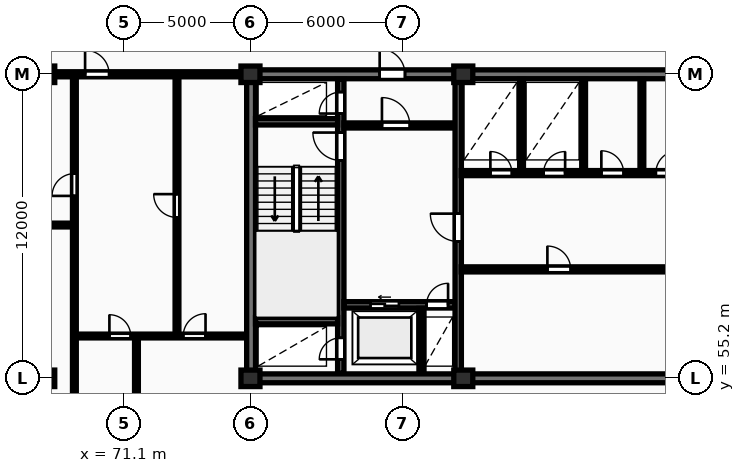
"""IFC4 building model, lengths in metres.
Left out: names, types, materials, properties, quantities, classifications, styles, units other than length and angle.
Written with IfcOpenShell. Run it as: python <this file> out.ifc"""

import sys

from ifc_helpers import new_model, si_unit, direction, frame, frame_2d, origin, origin_2d, place, context, subcontext, project, spatial, rectangle, extrude, element, fill, save


model = new_model("IFC4")
c1 = context("Model", 3, precision=1e-05, world=origin(), true_north=direction((0.0, 1.0)))
c2 = subcontext(c1, "Body", "Model", "MODEL_VIEW")
j1 = project(units=[si_unit("LENGTHUNIT", "METRE"), si_unit("PLANEANGLEUNIT", "RADIAN")], contexts=[c1])
p1 = place(None, origin())
s1 = spatial("IfcSite", under=j1, at=p1, CompositionType="ELEMENT")
p2 = place(p1, origin())
s2 = spatial("IfcBuilding", under=s1, at=p2, CompositionType="ELEMENT")
p3 = place(p2, frame((0.0, 0.0, 242.45)))
s3 = spatial("IfcBuildingStorey", under=s2, at=p3, CompositionType="ELEMENT", Elevation=242.45)
for number, where, z_axis, x_axis in (
    (1, (68.0, 55.2, 0.0), (0.0, 0.0, 1.0), (1.0, 0.0, 0.0)),
    (2, (68.0, 67.2, 0.0), (0.0, 0.0, 1.0), (1.0, 0.0, 0.0)),
    (3, (76.1, 55.2, 0.0), (0.0, 0.0, 1.0), (1.0, 0.0, 0.0)),
    (4, (76.1, 67.2, 0.0), (0.0, 0.0, 1.0), (1.0, 0.0, 0.0)),
    (5, (84.5, 55.2, 0.0), (0.0, 0.0, 1.0), (1.0, 0.0, 0.0)),
    (6, (84.5, 67.2, 0.0), (0.0, 0.0, 1.0), (1.0, 0.0, 0.0)),
):
    element("IfcColumn", number, at=place(p3, frame(where, z_axis=z_axis, x_axis=x_axis)), inside=s3, PredefinedType="COLUMN", context=c2, shape_type="SweptSolid", body=[
        extrude(rectangle(XDim=0.75, YDim=0.65, at=origin_2d()), origin(), (0.0, 0.0, 1.0), 3.45),
    ])
p4 = place(p3, frame((75.95, 55.2, 0.0), z_axis=(0.0, 0.0, 1.0), x_axis=(1.0, 0.0, 0.0)))
e7 = element("IfcWall", 7, at=p4, inside=s3, PredefinedType="SHEAR", context=c2, shape_type="SweptSolid", body=[
    extrude(rectangle(XDim=36.3, YDim=0.35, at=frame_2d((18.15, 0.0))), origin(), (0.0, 0.0, 1.0), 3.45),
])
p5 = place(p3, frame((76.125, 55.375, 0.0), z_axis=(0.0, 0.0, 1.0), x_axis=(0.0, 1.0, 0.0)))
e8 = element("IfcWall", 8, at=p5, inside=s3, PredefinedType="SHEAR", context=c2, shape_type="SweptSolid", body=[
    extrude(rectangle(XDim=11.65, YDim=0.35, at=frame_2d((5.825, 0.0))), origin(), (0.0, 0.0, 1.0), 3.45),
])
p6 = place(p3, frame((75.95, 67.2, 0.0), z_axis=(0.0, 0.0, 1.0), x_axis=(1.0, 0.0, 0.0)))
e9 = element("IfcWall", 9, at=p6, inside=s3, PredefinedType="SHEAR", context=c2, shape_type="SweptSolid", body=[
    extrude(rectangle(XDim=36.3, YDim=0.35, at=frame_2d((18.15, 0.0))), origin(), (0.0, 0.0, 1.0), 3.45),
])
p7 = place(p6, frame((5.25, 0.0, 0.0)))
e10 = element("IfcOpeningElement", 10, at=p7, cuts=e9, PredefinedType="OPENING", context=c2, shape_type="SweptSolid", body=[
    extrude(rectangle(XDim=1.0, YDim=2.15, at=frame_2d((0.5, 1.075))), frame((0.0, 0.185, 0.0), z_axis=(0.0, -1.0, 0.0), x_axis=(1.0, 0.0, 0.0)), (0.0, 0.0, 1.0), 0.37),
])
p8 = place(p6, frame((21.6, 0.0, 0.0)))
e11 = element("IfcOpeningElement", 11, at=p8, cuts=e9, PredefinedType="OPENING", context=c2, shape_type="SweptSolid", body=[
    extrude(rectangle(XDim=1.5, YDim=2.2, at=frame_2d((0.75, 1.1))), frame((0.0, 0.185, 0.0), z_axis=(0.0, -1.0, 0.0), x_axis=(1.0, 0.0, 0.0)), (0.0, 0.0, 1.0), 0.37),
])
p9 = place(p6, frame((30.45, 0.0, 0.0)))
e12 = element("IfcOpeningElement", 12, at=p9, cuts=e9, PredefinedType="OPENING", context=c2, shape_type="SweptSolid", body=[
    extrude(rectangle(XDim=1.0, YDim=2.15, at=frame_2d((0.5, 1.075))), frame((0.0, 0.185, 0.0), z_axis=(0.0, -1.0, 0.0), x_axis=(1.0, 0.0, 0.0)), (0.0, 0.0, 1.0), 0.37),
])
p10 = place(p3, frame((79.665, 55.4, 0.0), z_axis=(0.0, 0.0, 1.0), x_axis=(0.0, 1.0, 0.0)))
e13 = element("IfcWall", 13, at=p10, inside=s3, PredefinedType="SHEAR", context=c2, shape_type="SweptSolid", body=[
    extrude(rectangle(XDim=11.6, YDim=0.25, at=frame_2d((5.8, 0.0))), origin(), (0.0, 0.0, 1.0), 3.45),
])
p11 = place(p10, frame((0.55, 0.0, 0.0)))
e14 = element("IfcOpeningElement", 14, at=p11, cuts=e13, PredefinedType="OPENING", context=c2, shape_type="SweptSolid", body=[
    extrude(rectangle(XDim=0.85, YDim=2.05, at=frame_2d((0.425, 1.025))), frame((0.0, 0.135, 0.0), z_axis=(0.0, -1.0, 0.0), x_axis=(1.0, 0.0, 0.0)), (0.0, 0.0, 1.0), 0.27),
])
p12 = place(p10, frame((8.4, 0.0, 0.0)))
e15 = element("IfcOpeningElement", 15, at=p12, cuts=e13, PredefinedType="OPENING", context=c2, shape_type="SweptSolid", body=[
    extrude(rectangle(XDim=1.1, YDim=2.1, at=frame_2d((0.55, 1.05))), frame((0.0, 0.135, 0.0), z_axis=(0.0, -1.0, 0.0), x_axis=(1.0, 0.0, 0.0)), (0.0, 0.0, 1.0), 0.27),
])
p13 = place(p10, frame((10.25, 0.0, 0.0)))
e16 = element("IfcOpeningElement", 16, at=p13, cuts=e13, PredefinedType="OPENING", context=c2, shape_type="SweptSolid", body=[
    extrude(rectangle(XDim=0.85, YDim=2.05, at=frame_2d((0.425, 1.025))), frame((0.0, 0.135, 0.0), z_axis=(0.0, -1.0, 0.0), x_axis=(1.0, 0.0, 0.0)), (0.0, 0.0, 1.0), 0.27),
])
for number, where, z_axis, x_axis in (
    (17, (76.3, 57.475, 0.0), (0.0, 0.0, 1.0), (1.0, 0.0, 0.0)),
    (18, (76.3, 65.325, 0.0), (0.0, 0.0, 1.0), (1.0, 0.0, 0.0)),
):
    element("IfcWall", number, at=place(p3, frame(where, z_axis=z_axis, x_axis=x_axis)), inside=s3, PredefinedType="SHEAR", context=c2, shape_type="SweptSolid", body=[
        extrude(rectangle(XDim=3.24, YDim=0.25, at=frame_2d((1.62, 0.0))), origin(), (0.0, 0.0, 1.0), 3.45),
    ])
p14 = place(p3, frame((79.79, 58.1, 0.0), z_axis=(0.0, 0.0, 1.0), x_axis=(1.0, 0.0, 0.0)))
e19 = element("IfcWall", 19, at=p14, inside=s3, PredefinedType="SHEAR", context=c2, shape_type="SweptSolid", body=[
    extrude(rectangle(XDim=4.39, YDim=0.25, at=frame_2d((2.195, 0.0))), origin(), (0.0, 0.0, 1.0), 3.45),
])
p15 = place(p14, frame((1.05, 0.0, 0.0)))
e20 = element("IfcOpeningElement", 20, at=p15, cuts=e19, PredefinedType="OPENING", context=c2, shape_type="SweptSolid", body=[
    extrude(rectangle(XDim=1.12, YDim=2.12, at=frame_2d((0.56, 1.06))), frame((0.0, 0.135, 0.0), z_axis=(0.0, -1.0, 0.0), x_axis=(1.0, 0.0, 0.0)), (0.0, 0.0, 1.0), 0.27),
])
p16 = place(p14, frame((3.26, 0.0, 0.0)))
e21 = element("IfcOpeningElement", 21, at=p16, cuts=e19, PredefinedType="OPENING", context=c2, shape_type="SweptSolid", body=[
    extrude(rectangle(XDim=0.85, YDim=2.05, at=frame_2d((0.425, 1.025))), frame((0.0, 0.135, 0.0), z_axis=(0.0, -1.0, 0.0), x_axis=(1.0, 0.0, 0.0)), (0.0, 0.0, 1.0), 0.27),
])
p17 = place(p3, frame((82.85, 55.4, 0.0), z_axis=(0.0, 0.0, 1.0), x_axis=(0.0, 1.0, 0.0)))
e22 = element("IfcWall", 22, at=p17, inside=s3, PredefinedType="PARTITIONING", context=c2, shape_type="SweptSolid", body=[
    extrude(rectangle(XDim=2.56, YDim=0.2, at=frame_2d((1.28, 0.0))), origin(), (0.0, 0.0, 1.0), 3.17),
])
p18 = place(p3, frame((79.79, 65.18, 0.0), z_axis=(0.0, 0.0, 1.0), x_axis=(1.0, 0.0, 0.0)))
e23 = element("IfcWall", 23, at=p18, inside=s3, PredefinedType="PARTITIONING", context=c2, shape_type="SweptSolid", body=[
    extrude(rectangle(XDim=4.39, YDim=0.2, at=frame_2d((2.195, 0.0))), origin(), (0.0, 0.0, 1.0), 3.17),
])
p19 = place(p18, frame((1.5, 0.0, 0.0)))
e24 = element("IfcOpeningElement", 24, at=p19, cuts=e23, PredefinedType="OPENING", context=c2, shape_type="SweptSolid", body=[
    extrude(rectangle(XDim=1.1, YDim=2.1, at=frame_2d((0.55, 1.05))), frame((0.0, 0.11, 0.0), z_axis=(0.0, -1.0, 0.0), x_axis=(1.0, 0.0, 0.0)), (0.0, 0.0, 1.0), 0.22),
])
p20 = place(p3, frame((84.3, 55.4, 0.0), z_axis=(0.0, 0.0, 1.0), x_axis=(0.0, 1.0, 0.0)))
e25 = element("IfcWall", 25, at=p20, inside=s3, PredefinedType="SHEAR", context=c2, shape_type="SweptSolid", body=[
    extrude(rectangle(XDim=11.6, YDim=0.25, at=frame_2d((5.8, 0.0))), origin(), (0.0, 0.0, 1.0), 3.45),
])
p21 = place(p20, frame((5.2, 0.0, 0.0)))
e26 = element("IfcOpeningElement", 26, at=p21, cuts=e25, PredefinedType="OPENING", context=c2, shape_type="SweptSolid", body=[
    extrude(rectangle(XDim=1.1, YDim=2.1, at=frame_2d((0.55, 1.05))), frame((0.0, 0.135, 0.0), z_axis=(0.0, -1.0, 0.0), x_axis=(1.0, 0.0, 0.0)), (0.0, 0.0, 1.0), 0.27),
])
p22 = place(p3, frame((84.42, 59.5, 0.0), z_axis=(0.0, 0.0, 1.0), x_axis=(1.0, 0.0, 0.0)))
e27 = element("IfcWall", 27, at=p22, inside=s3, PredefinedType="PARTITIONING", context=c2, shape_type="SweptSolid", body=[
    extrude(rectangle(XDim=8.36, YDim=0.2, at=frame_2d((4.18, 0.0))), origin(), (0.0, 0.0, 1.0), 3.17),
])
p23 = place(p22, frame((3.4, 0.0, 0.0)))
e28 = element("IfcOpeningElement", 28, at=p23, cuts=e27, PredefinedType="OPENING", context=c2, shape_type="SweptSolid", body=[
    extrude(rectangle(XDim=0.92, YDim=2.08, at=frame_2d((0.46, 1.04))), frame((0.0, 0.11, 0.0), z_axis=(0.0, -1.0, 0.0), x_axis=(1.0, 0.0, 0.0)), (0.0, 0.0, 1.0), 0.22),
])
for number, where, z_axis, x_axis in (
    (29, (86.8, 63.4, 0.0), (0.0, 0.0, 1.0), (0.0, 1.0, 0.0)),
    (30, (89.25, 63.4, 0.0), (0.0, 0.0, 1.0), (0.0, 1.0, 0.0)),
    (31, (91.55, 63.4, 0.0), (0.0, 0.0, 1.0), (0.0, 1.0, 0.0)),
):
    element("IfcWall", number, at=place(p3, frame(where, z_axis=z_axis, x_axis=x_axis)), inside=s3, PredefinedType="PARTITIONING", context=c2, shape_type="SweptSolid", body=[
        extrude(rectangle(XDim=3.6, YDim=0.15, at=frame_2d((1.8, 0.0))), origin(), (0.0, 0.0, 1.0), 3.17),
    ])
p24 = place(p3, frame((84.42, 63.3, 0.0), z_axis=(0.0, 0.0, 1.0), x_axis=(1.0, 0.0, 0.0)))
e32 = element("IfcWall", 32, at=p24, inside=s3, PredefinedType="PARTITIONING", context=c2, shape_type="SweptSolid", body=[
    extrude(rectangle(XDim=19.83, YDim=0.2, at=frame_2d((9.915, 0.0))), origin(), (0.0, 0.0, 1.0), 3.17),
])
p25 = place(p24, frame((1.15, 0.0, 0.0)))
e33 = element("IfcOpeningElement", 33, at=p25, cuts=e32, PredefinedType="OPENING", context=c2, shape_type="SweptSolid", body=[
    extrude(rectangle(XDim=0.85, YDim=2.05, at=frame_2d((0.425, 1.025))), frame((0.0, 0.11, 0.0), z_axis=(0.0, -1.0, 0.0), x_axis=(1.0, 0.0, 0.0)), (0.0, 0.0, 1.0), 0.22),
])
p26 = place(p24, frame((3.25, 0.0, 0.0)))
e34 = element("IfcOpeningElement", 34, at=p26, cuts=e32, PredefinedType="OPENING", context=c2, shape_type="SweptSolid", body=[
    extrude(rectangle(XDim=0.85, YDim=2.05, at=frame_2d((0.425, 1.025))), frame((0.0, 0.11, 0.0), z_axis=(0.0, -1.0, 0.0), x_axis=(1.0, 0.0, 0.0)), (0.0, 0.0, 1.0), 0.22),
])
p27 = place(p24, frame((13.08, 0.0, 0.0)))
e35 = element("IfcOpeningElement", 35, at=p27, cuts=e32, PredefinedType="OPENING", context=c2, shape_type="SweptSolid", body=[
    extrude(rectangle(XDim=1.5, YDim=2.2, at=frame_2d((0.75, 1.1))), frame((0.0, 0.11, 0.0), z_axis=(0.0, -1.0, 0.0), x_axis=(1.0, 0.0, 0.0)), (0.0, 0.0, 1.0), 0.22),
])
p28 = place(p24, frame((5.53, 0.0, 0.0)))
e36 = element("IfcOpeningElement", 36, at=p28, cuts=e32, PredefinedType="OPENING", context=c2, shape_type="SweptSolid", body=[
    extrude(rectangle(XDim=0.88, YDim=2.06, at=frame_2d((0.44, 1.03))), frame((0.0, 0.11, 0.0), z_axis=(0.0, -1.0, 0.0), x_axis=(1.0, 0.0, 0.0)), (0.0, 0.0, 1.0), 0.22),
])
p29 = place(p24, frame((7.68, 0.0, 0.0)))
e37 = element("IfcOpeningElement", 37, at=p29, cuts=e32, PredefinedType="OPENING", context=c2, shape_type="SweptSolid", body=[
    extrude(rectangle(XDim=0.88, YDim=2.06, at=frame_2d((0.44, 1.03))), frame((0.0, 0.11, 0.0), z_axis=(0.0, -1.0, 0.0), x_axis=(1.0, 0.0, 0.0)), (0.0, 0.0, 1.0), 0.22),
])
p30 = place(p24, frame((10.43, 0.0, 0.0)))
e38 = element("IfcOpeningElement", 38, at=p30, cuts=e32, PredefinedType="OPENING", context=c2, shape_type="SweptSolid", body=[
    extrude(rectangle(XDim=0.85, YDim=2.05, at=frame_2d((0.425, 1.025))), frame((0.0, 0.11, 0.0), z_axis=(0.0, -1.0, 0.0), x_axis=(1.0, 0.0, 0.0)), (0.0, 0.0, 1.0), 0.22),
])
p31 = place(p24, frame((16.23, 0.0, 0.0)))
e39 = element("IfcOpeningElement", 39, at=p31, cuts=e32, PredefinedType="OPENING", context=c2, shape_type="SweptSolid", body=[
    extrude(rectangle(XDim=0.96, YDim=2.1, at=frame_2d((0.48, 1.05))), frame((0.0, 0.11, 0.0), z_axis=(0.0, -1.0, 0.0), x_axis=(1.0, 0.0, 0.0)), (0.0, 0.0, 1.0), 0.22),
])
p32 = place(p24, frame((18.68, 0.0, 0.0)))
e40 = element("IfcOpeningElement", 40, at=p32, cuts=e32, PredefinedType="OPENING", context=c2, shape_type="SweptSolid", body=[
    extrude(rectangle(XDim=0.84, YDim=2.04, at=frame_2d((0.42, 1.02))), frame((0.0, 0.11, 0.0), z_axis=(0.0, -1.0, 0.0), x_axis=(1.0, 0.0, 0.0)), (0.0, 0.0, 1.0), 0.22),
])
p33 = place(p3, frame((59.8, 61.25, 0.0), z_axis=(0.0, 0.0, 1.0), x_axis=(1.0, 0.0, 0.0)))
e41 = element("IfcWall", 41, at=p33, inside=s3, PredefinedType="PARTITIONING", context=c2, shape_type="SweptSolid", body=[
    extrude(rectangle(XDim=9.35, YDim=0.15, at=frame_2d((4.675, 0.0))), origin(), (0.0, 0.0, 1.0), 3.17),
])
p34 = place(p33, frame((4.255, 0.0, 0.0)))
e42 = element("IfcOpeningElement", 42, at=p34, cuts=e41, PredefinedType="OPENING", context=c2, shape_type="SweptSolid", body=[
    extrude(rectangle(XDim=0.84, YDim=2.04, at=frame_2d((0.42, 1.02))), frame((0.0, 0.085, 0.0), z_axis=(0.0, -1.0, 0.0), x_axis=(1.0, 0.0, 0.0)), (0.0, 0.0, 1.0), 0.17),
])
p35 = place(p3, frame((69.15, 51.9, 0.0), z_axis=(0.0, 0.0, 1.0), x_axis=(0.0, 1.0, 0.0)))
e43 = element("IfcWall", 43, at=p35, inside=s3, PredefinedType="PARTITIONING", context=c2, shape_type="SweptSolid", body=[
    extrude(rectangle(XDim=15.25, YDim=0.15, at=frame_2d((7.625, 0.0))), origin(), (0.0, 0.0, 1.0), 3.17),
])
p36 = place(p35, frame((10.5, 0.0, 0.0)))
e44 = element("IfcOpeningElement", 44, at=p36, cuts=e43, PredefinedType="OPENING", context=c2, shape_type="SweptSolid", body=[
    extrude(rectangle(XDim=0.88, YDim=2.06, at=frame_2d((0.44, 1.03))), frame((0.0, 0.085, 0.0), z_axis=(0.0, -1.0, 0.0), x_axis=(1.0, 0.0, 0.0)), (0.0, 0.0, 1.0), 0.17),
])
p37 = place(p3, frame((73.2, 56.87, 0.0), z_axis=(0.0, 0.0, 1.0), x_axis=(0.0, 1.0, 0.0)))
e45 = element("IfcWall", 45, at=p37, inside=s3, PredefinedType="PARTITIONING", context=c2, shape_type="SweptSolid", body=[
    extrude(rectangle(XDim=10.28, YDim=0.15, at=frame_2d((5.14, 0.0))), origin(), (0.0, 0.0, 1.0), 3.17),
])
p38 = place(p37, frame((4.68, 0.0, 0.0)))
e46 = element("IfcOpeningElement", 46, at=p38, cuts=e45, PredefinedType="OPENING", context=c2, shape_type="SweptSolid", body=[
    extrude(rectangle(XDim=0.92, YDim=2.08, at=frame_2d((0.46, 1.04))), frame((0.0, 0.085, 0.0), z_axis=(0.0, -1.0, 0.0), x_axis=(1.0, 0.0, 0.0)), (0.0, 0.0, 1.0), 0.17),
])
p39 = place(p3, frame((71.6, 51.9, 0.0), z_axis=(0.0, 0.0, 1.0), x_axis=(0.0, 1.0, 0.0)))
e47 = element("IfcWall", 47, at=p39, inside=s3, PredefinedType="PARTITIONING", context=c2, shape_type="SweptSolid", body=[
    extrude(rectangle(XDim=4.97, YDim=0.15, at=frame_2d((2.485, 0.0))), origin(), (0.0, 0.0, 1.0), 3.17),
])
p40 = place(p3, frame((69.17, 56.87, 0.0), z_axis=(0.0, 0.0, 1.0), x_axis=(1.0, 0.0, 0.0)))
e48 = element("IfcWall", 48, at=p40, inside=s3, PredefinedType="PARTITIONING", context=c2, shape_type="SweptSolid", body=[
    extrude(rectangle(XDim=6.76, YDim=0.15, at=frame_2d((3.38, 0.0))), origin(), (0.0, 0.0, 1.0), 3.17),
])
p41 = place(p40, frame((1.362, 0.0, 0.0)))
e49 = element("IfcOpeningElement", 49, at=p41, cuts=e48, PredefinedType="OPENING", context=c2, shape_type="SweptSolid", body=[
    extrude(rectangle(XDim=0.84, YDim=2.04, at=frame_2d((0.42, 1.02))), frame((0.0, 0.085, 0.0), z_axis=(0.0, -1.0, 0.0), x_axis=(1.0, 0.0, 0.0)), (0.0, 0.0, 1.0), 0.17),
])
p42 = place(p40, frame((4.277, 0.0, 0.0)))
e50 = element("IfcOpeningElement", 50, at=p42, cuts=e48, PredefinedType="OPENING", context=c2, shape_type="SweptSolid", body=[
    extrude(rectangle(XDim=0.88, YDim=2.06, at=frame_2d((0.44, 1.03))), frame((0.0, 0.085, 0.0), z_axis=(0.0, -1.0, 0.0), x_axis=(1.0, 0.0, 0.0)), (0.0, 0.0, 1.0), 0.17),
])
p43 = place(p3, frame((59.8, 67.2, 0.0), z_axis=(0.0, 0.0, 1.0), x_axis=(1.0, 0.0, 0.0)))
e51 = element("IfcWall", 51, at=p43, inside=s3, PredefinedType="PARTITIONING", context=c2, shape_type="SweptSolid", body=[
    extrude(rectangle(XDim=16.15, YDim=0.2, at=frame_2d((8.075, 0.0))), origin(), (0.0, 0.0, 1.0), 2.633),
])
p44 = place(p43, frame((9.772, 0.0, 0.0)))
e52 = element("IfcOpeningElement", 52, at=p44, cuts=e51, PredefinedType="OPENING", context=c2, shape_type="SweptSolid", body=[
    extrude(rectangle(XDim=0.95, YDim=2.15, at=frame_2d((0.475, 1.075))), frame((0.0, 0.11, 0.0), z_axis=(0.0, -1.0, 0.0), x_axis=(1.0, 0.0, 0.0)), (0.0, 0.0, 1.0), 0.22),
])
p45 = place(p7, origin())
e53 = element("IfcDoor", 53, at=p45, inside=s3, OperationType="SINGLE_SWING_LEFT", PredefinedType="DOOR", context=c2, shape_type="SweptSolid", body=[
    extrude(rectangle(XDim=1.0, YDim=2.15, at=frame_2d((0.5, 1.075))), frame((0.0, 0.025, 0.0), z_axis=(0.0, -1.0, 0.0), x_axis=(1.0, 0.0, 0.0)), (0.0, 0.0, 1.0), 0.05),
])
fill(e10, e53)
p46 = place(p11, origin())
e54 = element("IfcDoor", 54, at=p46, inside=s3, OperationType="SINGLE_SWING_LEFT", PredefinedType="DOOR", context=c2, shape_type="SweptSolid", body=[
    extrude(rectangle(XDim=0.85, YDim=2.05, at=frame_2d((0.425, 1.025))), frame((0.0, 0.025, 0.0), z_axis=(0.0, -1.0, 0.0), x_axis=(1.0, 0.0, 0.0)), (0.0, 0.0, 1.0), 0.05),
])
fill(e14, e54)
p47 = place(p12, origin())
e55 = element("IfcDoor", 55, at=p47, inside=s3, OperationType="SINGLE_SWING_RIGHT", PredefinedType="DOOR", context=c2, shape_type="SweptSolid", body=[
    extrude(rectangle(XDim=1.1, YDim=2.1, at=frame_2d((0.55, 1.05))), frame((0.0, 0.025, 0.0), z_axis=(0.0, -1.0, 0.0), x_axis=(1.0, 0.0, 0.0)), (0.0, 0.0, 1.0), 0.05),
])
fill(e15, e55)
p48 = place(p13, origin())
e56 = element("IfcDoor", 56, at=p48, inside=s3, OperationType="SINGLE_SWING_LEFT", PredefinedType="DOOR", context=c2, shape_type="SweptSolid", body=[
    extrude(rectangle(XDim=0.85, YDim=2.05, at=frame_2d((0.425, 1.025))), frame((0.0, 0.025, 0.0), z_axis=(0.0, -1.0, 0.0), x_axis=(1.0, 0.0, 0.0)), (0.0, 0.0, 1.0), 0.05),
])
fill(e16, e56)
p49 = place(p15, origin())
e57 = element("IfcDoor", 57, at=p49, inside=s3, OperationType="SLIDING_TO_LEFT", PredefinedType="DOOR", context=c2, shape_type="SweptSolid", body=[
    extrude(rectangle(XDim=1.12, YDim=2.12, at=frame_2d((0.56, 1.06))), frame((0.0, 0.025, 0.0), z_axis=(0.0, -1.0, 0.0), x_axis=(1.0, 0.0, 0.0)), (0.0, 0.0, 1.0), 0.05),
])
fill(e20, e57)
p50 = place(p16, origin())
e58 = element("IfcDoor", 58, at=p50, inside=s3, OperationType="SINGLE_SWING_RIGHT", PredefinedType="DOOR", context=c2, shape_type="SweptSolid", body=[
    extrude(rectangle(XDim=0.85, YDim=2.05, at=frame_2d((0.425, 1.025))), frame((0.0, 0.025, 0.0), z_axis=(0.0, -1.0, 0.0), x_axis=(1.0, 0.0, 0.0)), (0.0, 0.0, 1.0), 0.05),
])
fill(e21, e58)
p51 = place(p19, origin())
e59 = element("IfcDoor", 59, at=p51, inside=s3, OperationType="SINGLE_SWING_LEFT", PredefinedType="DOOR", context=c2, shape_type="SweptSolid", body=[
    extrude(rectangle(XDim=1.1, YDim=2.1, at=frame_2d((0.55, 1.05))), frame((0.0, 0.025, 0.0), z_axis=(0.0, -1.0, 0.0), x_axis=(1.0, 0.0, 0.0)), (0.0, 0.0, 1.0), 0.05),
])
fill(e24, e59)
p52 = place(p21, origin())
e60 = element("IfcDoor", 60, at=p52, inside=s3, OperationType="SINGLE_SWING_RIGHT", PredefinedType="DOOR", context=c2, shape_type="SweptSolid", body=[
    extrude(rectangle(XDim=1.1, YDim=2.1, at=frame_2d((0.55, 1.05))), frame((0.0, 0.025, 0.0), z_axis=(0.0, -1.0, 0.0), x_axis=(1.0, 0.0, 0.0)), (0.0, 0.0, 1.0), 0.05),
])
fill(e26, e60)
p53 = place(p23, origin())
e61 = element("IfcDoor", 61, at=p53, inside=s3, OperationType="SINGLE_SWING_LEFT", PredefinedType="DOOR", context=c2, shape_type="SweptSolid", body=[
    extrude(rectangle(XDim=0.92, YDim=2.08, at=frame_2d((0.46, 1.04))), frame((0.0, 0.025, 0.0), z_axis=(0.0, -1.0, 0.0), x_axis=(1.0, 0.0, 0.0)), (0.0, 0.0, 1.0), 0.05),
])
fill(e28, e61)
p54 = place(p25, origin())
e62 = element("IfcDoor", 62, at=p54, inside=s3, OperationType="SINGLE_SWING_LEFT", PredefinedType="DOOR", context=c2, shape_type="SweptSolid", body=[
    extrude(rectangle(XDim=0.85, YDim=2.05, at=frame_2d((0.425, 1.025))), frame((0.0, 0.025, 0.0), z_axis=(0.0, -1.0, 0.0), x_axis=(1.0, 0.0, 0.0)), (0.0, 0.0, 1.0), 0.05),
])
fill(e33, e62)
p55 = place(p26, origin())
e63 = element("IfcDoor", 63, at=p55, inside=s3, OperationType="SINGLE_SWING_RIGHT", PredefinedType="DOOR", context=c2, shape_type="SweptSolid", body=[
    extrude(rectangle(XDim=0.85, YDim=2.05, at=frame_2d((0.425, 1.025))), frame((0.0, 0.025, 0.0), z_axis=(0.0, -1.0, 0.0), x_axis=(1.0, 0.0, 0.0)), (0.0, 0.0, 1.0), 0.05),
])
fill(e34, e63)
p56 = place(p28, origin())
e64 = element("IfcDoor", 64, at=p56, inside=s3, OperationType="SINGLE_SWING_LEFT", PredefinedType="DOOR", context=c2, shape_type="SweptSolid", body=[
    extrude(rectangle(XDim=0.88, YDim=2.06, at=frame_2d((0.44, 1.03))), frame((0.0, 0.025, 0.0), z_axis=(0.0, -1.0, 0.0), x_axis=(1.0, 0.0, 0.0)), (0.0, 0.0, 1.0), 0.05),
])
fill(e36, e64)
p57 = place(p29, origin())
e65 = element("IfcDoor", 65, at=p57, inside=s3, OperationType="SINGLE_SWING_RIGHT", PredefinedType="DOOR", context=c2, shape_type="SweptSolid", body=[
    extrude(rectangle(XDim=0.88, YDim=2.06, at=frame_2d((0.44, 1.03))), frame((0.0, 0.025, 0.0), z_axis=(0.0, -1.0, 0.0), x_axis=(1.0, 0.0, 0.0)), (0.0, 0.0, 1.0), 0.05),
])
fill(e37, e65)
p58 = place(p36, origin())
e66 = element("IfcDoor", 66, at=p58, inside=s3, OperationType="SINGLE_SWING_LEFT", PredefinedType="DOOR", context=c2, shape_type="SweptSolid", body=[
    extrude(rectangle(XDim=0.88, YDim=2.06, at=frame_2d((0.44, 1.03))), frame((0.0, 0.025, 0.0), z_axis=(0.0, -1.0, 0.0), x_axis=(1.0, 0.0, 0.0)), (0.0, 0.0, 1.0), 0.05),
])
fill(e44, e66)
p59 = place(p38, origin())
e67 = element("IfcDoor", 67, at=p59, inside=s3, OperationType="SINGLE_SWING_RIGHT", PredefinedType="DOOR", context=c2, shape_type="SweptSolid", body=[
    extrude(rectangle(XDim=0.92, YDim=2.08, at=frame_2d((0.46, 1.04))), frame((0.0, 0.025, 0.0), z_axis=(0.0, -1.0, 0.0), x_axis=(1.0, 0.0, 0.0)), (0.0, 0.0, 1.0), 0.05),
])
fill(e46, e67)
p60 = place(p41, origin())
e68 = element("IfcDoor", 68, at=p60, inside=s3, OperationType="SINGLE_SWING_LEFT", PredefinedType="DOOR", context=c2, shape_type="SweptSolid", body=[
    extrude(rectangle(XDim=0.84, YDim=2.04, at=frame_2d((0.42, 1.02))), frame((0.0, 0.025, 0.0), z_axis=(0.0, -1.0, 0.0), x_axis=(1.0, 0.0, 0.0)), (0.0, 0.0, 1.0), 0.05),
])
fill(e49, e68)
p61 = place(p42, origin())
e69 = element("IfcDoor", 69, at=p61, inside=s3, OperationType="SINGLE_SWING_RIGHT", PredefinedType="DOOR", context=c2, shape_type="SweptSolid", body=[
    extrude(rectangle(XDim=0.88, YDim=2.06, at=frame_2d((0.44, 1.03))), frame((0.0, 0.025, 0.0), z_axis=(0.0, -1.0, 0.0), x_axis=(1.0, 0.0, 0.0)), (0.0, 0.0, 1.0), 0.05),
])
fill(e50, e69)
p62 = place(p44, origin())
e70 = element("IfcDoor", 70, at=p62, inside=s3, OperationType="SINGLE_SWING_LEFT", PredefinedType="DOOR", context=c2, shape_type="SweptSolid", body=[
    extrude(rectangle(XDim=0.95, YDim=2.15, at=frame_2d((0.475, 1.075))), frame((0.0, 0.025, 0.0), z_axis=(0.0, -1.0, 0.0), x_axis=(1.0, 0.0, 0.0)), (0.0, 0.0, 1.0), 0.05),
])
fill(e52, e70)
save(model, sys.argv[1])
